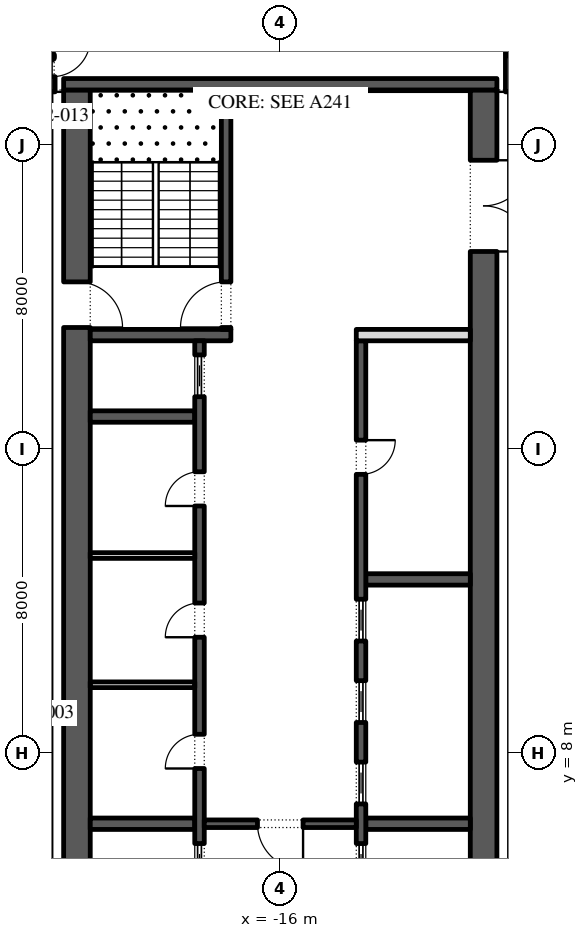
"""IFC4 building model, lengths in metres.
Left out: names, types, materials, properties, quantities, classifications, styles, units other than length and angle.
Written with IfcOpenShell. Run it as: python <this file> out.ifc"""

import sys

from ifc_helpers import new_model, si_unit, direction, frame, frame_2d, origin, place, context, subcontext, project, spatial, rectangle, extrude, element, fill, save


model = new_model("IFC4")
c1 = context("Model", 3, precision=1e-05, world=origin(), true_north=direction((0.0, 1.0)))
c2 = subcontext(c1, "Body", "Model", "MODEL_VIEW")
j1 = project(units=[si_unit("LENGTHUNIT", "METRE"), si_unit("PLANEANGLEUNIT", "RADIAN")], contexts=[c1])
p1 = place(None, origin())
s1 = spatial("IfcSite", under=j1, at=p1, CompositionType="ELEMENT")
p2 = place(p1, origin())
s2 = spatial("IfcBuilding", under=s1, at=p2, CompositionType="ELEMENT")
p3 = place(p2, frame((0.0, 0.0, 175.8)))
s3 = spatial("IfcBuildingStorey", under=s2, at=p3, CompositionType="ELEMENT", Elevation=175.8)
p4 = place(p3, frame((-33.157, 30.092, 0.0), z_axis=(0.0, 0.0, 1.0), x_axis=(0.224950279389, -0.974370243697, 0.0)))
e1 = element("IfcWall", 1, at=p4, inside=s3, PredefinedType="STANDARD", context=c2, shape_type="SweptSolid", body=[
    extrude(rectangle(XDim=49.5, YDim=0.3, at=frame_2d((24.75, 0.0))), origin(), (0.0, 0.0, 1.0), 4.0),
])
p5 = place(p4, frame((2.207, 0.0, 0.0)))
e2 = element("IfcOpeningElement", 2, at=p5, cuts=e1, PredefinedType="OPENING", context=c2, shape_type="SweptSolid", body=[
    extrude(rectangle(XDim=2.4, YDim=3.5, at=frame_2d((1.2, 1.75))), frame((0.0, 0.16, 0.0), z_axis=(0.0, -1.0, 0.0), x_axis=(1.0, 0.0, 0.0)), (0.0, 0.0, 1.0), 0.32),
])
p6 = place(p4, frame((8.121, 0.0, 0.45)))
e3 = element("IfcOpeningElement", 3, at=p6, cuts=e1, PredefinedType="OPENING", context=c2, shape_type="SweptSolid", body=[
    extrude(rectangle(XDim=4.5, YDim=2.825, at=frame_2d((2.25, 1.413))), frame((0.0, 0.16, 0.0), z_axis=(0.0, -1.0, 0.0), x_axis=(1.0, 0.0, 0.0)), (0.0, 0.0, 1.0), 0.32),
])
p7 = place(p4, frame((15.236, 0.0, 0.45)))
e4 = element("IfcOpeningElement", 4, at=p7, cuts=e1, PredefinedType="OPENING", context=c2, shape_type="SweptSolid", body=[
    extrude(rectangle(XDim=4.5, YDim=2.95, at=frame_2d((2.25, 1.475))), frame((0.0, 0.16, 0.0), z_axis=(0.0, -1.0, 0.0), x_axis=(1.0, 0.0, 0.0)), (0.0, 0.0, 1.0), 0.32),
])
p8 = place(p4, frame((22.35, 0.0, 0.45)))
e5 = element("IfcOpeningElement", 5, at=p8, cuts=e1, PredefinedType="OPENING", context=c2, shape_type="SweptSolid", body=[
    extrude(rectangle(XDim=4.5, YDim=3.0, at=frame_2d((2.25, 1.5))), frame((0.0, 0.16, 0.0), z_axis=(0.0, -1.0, 0.0), x_axis=(1.0, 0.0, 0.0)), (0.0, 0.0, 1.0), 0.32),
])
p9 = place(p4, frame((30.514, 0.0, 0.0)))
e6 = element("IfcOpeningElement", 6, at=p9, cuts=e1, PredefinedType="OPENING", context=c2, shape_type="SweptSolid", body=[
    extrude(rectangle(XDim=2.4, YDim=3.5, at=frame_2d((1.2, 1.75))), frame((0.0, 0.16, 0.0), z_axis=(0.0, -1.0, 0.0), x_axis=(1.0, 0.0, 0.0)), (0.0, 0.0, 1.0), 0.32),
])
p10 = place(p4, frame((36.579, 0.0, 0.45)))
e7 = element("IfcOpeningElement", 7, at=p10, cuts=e1, PredefinedType="OPENING", context=c2, shape_type="SweptSolid", body=[
    extrude(rectangle(XDim=4.5, YDim=3.05, at=frame_2d((2.25, 1.525))), frame((0.0, 0.16, 0.0), z_axis=(0.0, -1.0, 0.0), x_axis=(1.0, 0.0, 0.0)), (0.0, 0.0, 1.0), 0.32),
])
p11 = place(p4, frame((43.693, 0.0, 0.45)))
e8 = element("IfcOpeningElement", 8, at=p11, cuts=e1, PredefinedType="OPENING", context=c2, shape_type="SweptSolid", body=[
    extrude(rectangle(XDim=4.5, YDim=3.05, at=frame_2d((2.25, 1.525))), frame((0.0, 0.16, 0.0), z_axis=(0.0, -1.0, 0.0), x_axis=(1.0, 0.0, 0.0)), (0.0, 0.0, 1.0), 0.32),
])
p12 = place(p3, frame((-21.35, -2.45, 0.0), z_axis=(0.0, 0.0, 1.0), x_axis=(0.0, 1.0, 0.0)))
e9 = element("IfcWall", 9, at=p12, inside=s3, PredefinedType="SHEAR", context=c2, shape_type="SweptSolid", body=[
    extrude(rectangle(XDim=27.9, YDim=0.7, at=frame_2d((13.95, 0.0))), origin(), (0.0, 0.0, 1.0), 4.0),
])
p13 = place(p12, frame((5.05, 0.0, 0.0)))
e10 = element("IfcOpeningElement", 10, at=p13, cuts=e9, PredefinedType="OPENING", context=c2, shape_type="SweptSolid", body=[
    extrude(rectangle(XDim=1.2, YDim=2.1, at=frame_2d((0.6, 1.05))), frame((0.0, 0.36, 0.0), z_axis=(0.0, -1.0, 0.0), x_axis=(1.0, 0.0, 0.0)), (0.0, 0.0, 1.0), 0.72),
])
p14 = place(p12, frame((21.65, 0.0, 0.0)))
e11 = element("IfcOpeningElement", 11, at=p14, cuts=e9, PredefinedType="OPENING", context=c2, shape_type="SweptSolid", body=[
    extrude(rectangle(XDim=1.2, YDim=2.1, at=frame_2d((0.6, 1.05))), frame((0.0, 0.36, 0.0), z_axis=(0.0, -1.0, 0.0), x_axis=(1.0, 0.0, 0.0)), (0.0, 0.0, 1.0), 0.72),
])
p15 = place(p3, frame((-10.65, -2.45, 0.0), z_axis=(0.0, 0.0, 1.0), x_axis=(0.0, 1.0, 0.0)))
e12 = element("IfcWall", 12, at=p15, inside=s3, PredefinedType="SHEAR", context=c2, shape_type="SweptSolid", body=[
    extrude(rectangle(XDim=27.9, YDim=0.7, at=frame_2d((13.95, 0.0))), origin(), (0.0, 0.0, 1.0), 4.0),
])
p16 = place(p15, frame((23.65, 0.0, 0.0)))
e13 = element("IfcOpeningElement", 13, at=p16, cuts=e12, PredefinedType="OPENING", context=c2, shape_type="SweptSolid", body=[
    extrude(rectangle(XDim=2.4, YDim=2.1, at=frame_2d((1.2, 1.05))), frame((0.0, 0.36, 0.0), z_axis=(0.0, -1.0, 0.0), x_axis=(1.0, 0.0, 0.0)), (0.0, 0.0, 1.0), 0.72),
])
p17 = place(p15, frame((1.387, 0.0, 0.0)))
e14 = element("IfcOpeningElement", 14, at=p17, cuts=e12, PredefinedType="OPENING", context=c2, shape_type="SweptSolid", body=[
    extrude(rectangle(XDim=0.9, YDim=2.1, at=frame_2d((0.45, 1.05))), frame((0.0, 0.36, 0.0), z_axis=(0.0, -1.0, 0.0), x_axis=(1.0, 0.0, 0.0)), (0.0, 0.0, 1.0), 0.72),
])
p18 = place(p15, frame((4.562, 0.0, 0.0)))
e15 = element("IfcOpeningElement", 15, at=p18, cuts=e12, PredefinedType="OPENING", context=c2, shape_type="SweptSolid", body=[
    extrude(rectangle(XDim=1.0, YDim=2.1, at=frame_2d((0.5, 1.05))), frame((0.0, 0.36, 0.0), z_axis=(0.0, -1.0, 0.0), x_axis=(1.0, 0.0, 0.0)), (0.0, 0.0, 1.0), 0.72),
])
p19 = place(p3, frame((-21.7, 25.6, 0.0), z_axis=(0.0, 0.0, 1.0), x_axis=(1.0, 0.0, 0.0)))
e16 = element("IfcWall", 16, at=p19, inside=s3, PredefinedType="SHEAR", context=c2, shape_type="SweptSolid", body=[
    extrude(rectangle(XDim=11.4, YDim=0.3, at=frame_2d((5.7, 0.0))), origin(), (0.0, 0.0, 1.0), 4.0),
])
p20 = place(p3, frame((-21.0, 19.0, 0.0), z_axis=(0.0, 0.0, 1.0), x_axis=(1.0, 0.0, 0.0)))
e17 = element("IfcWall", 17, at=p20, inside=s3, PredefinedType="SHEAR", context=c2, shape_type="SweptSolid", body=[
    extrude(rectangle(XDim=3.7, YDim=0.3, at=frame_2d((1.85, 0.0))), origin(), (0.0, 0.0, 1.0), 4.0),
])
p21 = place(p3, frame((-17.425, 19.15, 0.0), z_axis=(0.0, 0.0, 1.0), x_axis=(0.0, 1.0, 0.0)))
e18 = element("IfcWall", 18, at=p21, inside=s3, PredefinedType="SHEAR", context=c2, shape_type="SweptSolid", body=[
    extrude(rectangle(XDim=6.3, YDim=0.25, at=frame_2d((3.15, 0.0))), origin(), (0.0, 0.0, 1.0), 4.0),
])
p22 = place(p21, frame((0.05, 0.0, 0.0)))
e19 = element("IfcOpeningElement", 19, at=p22, cuts=e18, PredefinedType="OPENING", context=c2, shape_type="SweptSolid", body=[
    extrude(rectangle(XDim=1.2, YDim=2.1, at=frame_2d((0.6, 1.05))), frame((0.0, 0.135, 0.0), z_axis=(0.0, -1.0, 0.0), x_axis=(1.0, 0.0, 0.0)), (0.0, 0.0, 1.0), 0.27),
])
for number, where, z_axis, x_axis in (
    (20, (-21.0, 6.143, 0.0), (0.0, 0.0, 1.0), (1.0, 0.0, 0.0)),
    (21, (-21.0, 16.857, 0.0), (0.0, 0.0, 1.0), (1.0, 0.0, 0.0)),
):
    element("IfcWall", number, at=place(p3, frame(where, z_axis=z_axis, x_axis=x_axis)), inside=s3, PredefinedType="SHEAR", context=c2, shape_type="SweptSolid", body=[
        extrude(rectangle(XDim=2.75, YDim=0.3, at=frame_2d((1.375, 0.0))), origin(), (0.0, 0.0, 1.0), 4.0),
    ])
p23 = place(p3, frame((-18.125, 4.15, 0.0), z_axis=(0.0, 0.0, 1.0), x_axis=(0.0, 1.0, 0.0)))
e22 = element("IfcWall", 22, at=p23, inside=s3, PredefinedType="SHEAR", context=c2, shape_type="SweptSolid", body=[
    extrude(rectangle(XDim=14.7, YDim=0.25, at=frame_2d((7.35, 0.0))), origin(), (0.0, 0.0, 1.0), 4.0),
])
p24 = place(p23, frame((3.446, 0.0, 0.0)))
e23 = element("IfcOpeningElement", 23, at=p24, cuts=e22, PredefinedType="OPENING", context=c2, shape_type="SweptSolid", body=[
    extrude(rectangle(XDim=0.9, YDim=2.1, at=frame_2d((0.45, 1.05))), frame((0.0, 0.135, 0.0), z_axis=(0.0, -1.0, 0.0), x_axis=(1.0, 0.0, 0.0)), (0.0, 0.0, 1.0), 0.27),
])
p25 = place(p23, frame((6.9, 0.0, 0.0)))
e24 = element("IfcOpeningElement", 24, at=p25, cuts=e22, PredefinedType="OPENING", context=c2, shape_type="SweptSolid", body=[
    extrude(rectangle(XDim=0.9, YDim=2.1, at=frame_2d((0.45, 1.05))), frame((0.0, 0.135, 0.0), z_axis=(0.0, -1.0, 0.0), x_axis=(1.0, 0.0, 0.0)), (0.0, 0.0, 1.0), 0.27),
])
p26 = place(p23, frame((10.354, 0.0, 0.0)))
e25 = element("IfcOpeningElement", 25, at=p26, cuts=e22, PredefinedType="OPENING", context=c2, shape_type="SweptSolid", body=[
    extrude(rectangle(XDim=0.9, YDim=2.1, at=frame_2d((0.45, 1.05))), frame((0.0, 0.135, 0.0), z_axis=(0.0, -1.0, 0.0), x_axis=(1.0, 0.0, 0.0)), (0.0, 0.0, 1.0), 0.27),
])
p27 = place(p23, frame((0.371, 0.0, 0.0)))
e26 = element("IfcOpeningElement", 26, at=p27, cuts=e22, PredefinedType="OPENING", context=c2, shape_type="SweptSolid", body=[
    extrude(rectangle(XDim=1.1, YDim=2.1, at=frame_2d((0.55, 1.05))), frame((0.0, 0.135, 0.0), z_axis=(0.0, -1.0, 0.0), x_axis=(1.0, 0.0, 0.0)), (0.0, 0.0, 1.0), 0.27),
])
p28 = place(p23, frame((13.229, 0.0, 0.0)))
e27 = element("IfcOpeningElement", 27, at=p28, cuts=e22, PredefinedType="OPENING", context=c2, shape_type="SweptSolid", body=[
    extrude(rectangle(XDim=1.1, YDim=2.1, at=frame_2d((0.55, 1.05))), frame((0.0, 0.135, 0.0), z_axis=(0.0, -1.0, 0.0), x_axis=(1.0, 0.0, 0.0)), (0.0, 0.0, 1.0), 0.27),
])
for number, where, z_axis, x_axis in (
    (28, (-21.0, 9.8, 0.0), (0.0, 0.0, 1.0), (1.0, 0.0, 0.0)),
    (29, (-21.0, 13.2, 0.0), (0.0, 0.0, 1.0), (1.0, 0.0, 0.0)),
):
    element("IfcWall", number, at=place(p3, frame(where, z_axis=z_axis, x_axis=x_axis)), inside=s3, PredefinedType="PARTITIONING", context=c2, shape_type="SweptSolid", body=[
        extrude(rectangle(XDim=2.75, YDim=0.15, at=frame_2d((1.375, 0.0))), origin(), (0.0, 0.0, 1.0), 4.0),
    ])
for number, where, z_axis, x_axis in (
    (30, (-13.75, 6.143, 0.0), (0.0, 0.0, 1.0), (1.0, 0.0, 0.0)),
    (31, (-13.75, 12.571, 0.0), (0.0, 0.0, 1.0), (1.0, 0.0, 0.0)),
):
    element("IfcWall", number, at=place(p3, frame(where, z_axis=z_axis, x_axis=x_axis)), inside=s3, PredefinedType="SHEAR", context=c2, shape_type="SweptSolid", body=[
        extrude(rectangle(XDim=2.75, YDim=0.3, at=frame_2d((1.375, 0.0))), origin(), (0.0, 0.0, 1.0), 4.0),
    ])
p29 = place(p3, frame((-13.875, -2.45, 0.0), z_axis=(0.0, 0.0, 1.0), x_axis=(0.0, 1.0, 0.0)))
e32 = element("IfcWall", 32, at=p29, inside=s3, PredefinedType="SHEAR", context=c2, shape_type="SweptSolid", body=[
    extrude(rectangle(XDim=21.3, YDim=0.25, at=frame_2d((10.65, 0.0))), origin(), (0.0, 0.0, 1.0), 4.0),
])
p30 = place(p29, frame((17.786, 0.0, 0.0)))
e33 = element("IfcOpeningElement", 33, at=p30, cuts=e32, PredefinedType="OPENING", context=c2, shape_type="SweptSolid", body=[
    extrude(rectangle(XDim=0.9, YDim=2.1, at=frame_2d((0.45, 1.05))), frame((0.0, 0.135, 0.0), z_axis=(0.0, -1.0, 0.0), x_axis=(1.0, 0.0, 0.0)), (0.0, 0.0, 1.0), 0.27),
])
p31 = place(p29, frame((6.971, 0.0, 0.0)))
e34 = element("IfcOpeningElement", 34, at=p31, cuts=e32, PredefinedType="OPENING", context=c2, shape_type="SweptSolid", body=[
    extrude(rectangle(XDim=1.1, YDim=2.1, at=frame_2d((0.55, 1.05))), frame((0.0, 0.135, 0.0), z_axis=(0.0, -1.0, 0.0), x_axis=(1.0, 0.0, 0.0)), (0.0, 0.0, 1.0), 0.27),
])
p32 = place(p29, frame((9.114, 0.0, 0.0)))
e35 = element("IfcOpeningElement", 35, at=p32, cuts=e32, PredefinedType="OPENING", context=c2, shape_type="SweptSolid", body=[
    extrude(rectangle(XDim=1.1, YDim=2.1, at=frame_2d((0.55, 1.05))), frame((0.0, 0.135, 0.0), z_axis=(0.0, -1.0, 0.0), x_axis=(1.0, 0.0, 0.0)), (0.0, 0.0, 1.0), 0.27),
])
p33 = place(p29, frame((11.257, 0.0, 0.0)))
e36 = element("IfcOpeningElement", 36, at=p33, cuts=e32, PredefinedType="OPENING", context=c2, shape_type="SweptSolid", body=[
    extrude(rectangle(XDim=1.1, YDim=2.1, at=frame_2d((0.55, 1.05))), frame((0.0, 0.135, 0.0), z_axis=(0.0, -1.0, 0.0), x_axis=(1.0, 0.0, 0.0)), (0.0, 0.0, 1.0), 0.27),
])
p34 = place(p29, frame((13.4, 0.0, 0.0)))
e37 = element("IfcOpeningElement", 37, at=p34, cuts=e32, PredefinedType="OPENING", context=c2, shape_type="SweptSolid", body=[
    extrude(rectangle(XDim=1.1, YDim=2.1, at=frame_2d((0.55, 1.05))), frame((0.0, 0.135, 0.0), z_axis=(0.0, -1.0, 0.0), x_axis=(1.0, 0.0, 0.0)), (0.0, 0.0, 1.0), 0.27),
])
p35 = place(p3, frame((-14.0, 19.0, 0.0), z_axis=(0.0, 0.0, 1.0), x_axis=(1.0, 0.0, 0.0)))
e38 = element("IfcWall", 38, at=p35, inside=s3, PredefinedType="PARTITIONING", context=c2, shape_type="SweptSolid", body=[
    extrude(rectangle(XDim=3.0, YDim=0.3, at=frame_2d((1.5, 0.0))), origin(), (0.0, 0.0, 1.0), 4.0),
])
p36 = place(p3, frame((-18.0, 6.143, 0.0), z_axis=(0.0, 0.0, 1.0), x_axis=(1.0, 0.0, 0.0)))
e39 = element("IfcWall", 39, at=p36, inside=s3, PredefinedType="SHEAR", context=c2, shape_type="SweptSolid", body=[
    extrude(rectangle(XDim=4.0, YDim=0.2, at=frame_2d((2.0, 0.0))), origin(), (0.0, 0.0, 1.0), 4.0),
])
p37 = place(p36, frame((1.4, 0.0, 0.0)))
e40 = element("IfcOpeningElement", 40, at=p37, cuts=e39, PredefinedType="OPENING", context=c2, shape_type="SweptSolid", body=[
    extrude(rectangle(XDim=1.2, YDim=2.1, at=frame_2d((0.6, 1.05))), frame((0.0, 0.11, 0.0), z_axis=(0.0, -1.0, 0.0), x_axis=(1.0, 0.0, 0.0)), (0.0, 0.0, 1.0), 0.22),
])
p38 = place(p3, frame((-22.0, 27.325, 0.0), z_axis=(0.0, 0.0, 1.0), x_axis=(0.0, -1.0, 0.0)))
e41 = element("IfcWall", 41, at=p38, inside=s3, PredefinedType="PARTITIONING", context=c2, shape_type="SweptSolid", body=[
    extrude(rectangle(XDim=1.925, YDim=0.15, at=frame_2d((0.962, 0.0))), origin(), (0.0, 0.0, 1.0), 4.0),
])
p39 = place(p38, frame((0.525, 0.0, 0.0)))
e42 = element("IfcOpeningElement", 42, at=p39, cuts=e41, PredefinedType="OPENING", context=c2, shape_type="SweptSolid", body=[
    extrude(rectangle(XDim=1.0, YDim=2.1, at=frame_2d((0.5, 1.05))), frame((0.0, 0.085, 0.0), z_axis=(0.0, -1.0, 0.0), x_axis=(1.0, 0.0, 0.0)), (0.0, 0.0, 1.0), 0.17),
])
p40 = place(p3, frame((-10.0, 25.4, 0.0), z_axis=(0.0, 0.0, 1.0), x_axis=(0.0, 1.0, 0.0)))
e43 = element("IfcWall", 43, at=p40, inside=s3, PredefinedType="PARTITIONING", context=c2, shape_type="SweptSolid", body=[
    extrude(rectangle(XDim=2.0, YDim=0.15, at=frame_2d((1.0, 0.0))), origin(), (0.0, 0.0, 1.0), 4.0),
])
p41 = place(p24, origin())
e44 = element("IfcDoor", 44, at=p41, inside=s3, OperationType="SINGLE_SWING_RIGHT", PredefinedType="DOOR", context=c2, shape_type="SweptSolid", body=[
    extrude(rectangle(XDim=0.9, YDim=2.1, at=frame_2d((0.45, 1.05))), frame((0.0, 0.125, 0.0), z_axis=(0.0, -1.0, 0.0), x_axis=(1.0, 0.0, 0.0)), (0.0, 0.0, 1.0), 0.05),
])
fill(e23, e44)
p42 = place(p25, origin())
e45 = element("IfcDoor", 45, at=p42, inside=s3, OperationType="SINGLE_SWING_RIGHT", PredefinedType="DOOR", context=c2, shape_type="SweptSolid", body=[
    extrude(rectangle(XDim=0.9, YDim=2.1, at=frame_2d((0.45, 1.05))), frame((0.0, 0.125, 0.0), z_axis=(0.0, -1.0, 0.0), x_axis=(1.0, 0.0, 0.0)), (0.0, 0.0, 1.0), 0.05),
])
fill(e24, e45)
p43 = place(p26, origin())
e46 = element("IfcDoor", 46, at=p43, inside=s3, OperationType="SINGLE_SWING_RIGHT", PredefinedType="DOOR", context=c2, shape_type="SweptSolid", body=[
    extrude(rectangle(XDim=0.9, YDim=2.1, at=frame_2d((0.45, 1.05))), frame((0.0, 0.125, 0.0), z_axis=(0.0, -1.0, 0.0), x_axis=(1.0, 0.0, 0.0)), (0.0, 0.0, 1.0), 0.05),
])
fill(e25, e46)
p44 = place(p27, origin())
e47 = element("IfcDoor", 47, at=p44, inside=s3, OperationType="SLIDING_TO_LEFT", PredefinedType="DOOR", context=c2, shape_type="SweptSolid", body=[
    extrude(rectangle(XDim=1.1, YDim=2.1, at=frame_2d((0.55, 1.05))), frame((0.0, 0.025, 0.0), z_axis=(0.0, -1.0, 0.0), x_axis=(1.0, 0.0, 0.0)), (0.0, 0.0, 1.0), 0.05),
])
fill(e26, e47)
p45 = place(p28, origin())
e48 = element("IfcDoor", 48, at=p45, inside=s3, OperationType="SLIDING_TO_LEFT", PredefinedType="DOOR", context=c2, shape_type="SweptSolid", body=[
    extrude(rectangle(XDim=1.1, YDim=2.1, at=frame_2d((0.55, 1.05))), frame((0.0, 0.025, 0.0), z_axis=(0.0, -1.0, 0.0), x_axis=(1.0, 0.0, 0.0)), (0.0, 0.0, 1.0), 0.05),
])
fill(e27, e48)
p46 = place(p30, frame((0.9, -0.2, 0.0), z_axis=(0.0, 0.0, 1.0), x_axis=(-1.0, 0.0, 0.0)))
e49 = element("IfcDoor", 49, at=p46, inside=s3, OperationType="SINGLE_SWING_RIGHT", PredefinedType="DOOR", context=c2, shape_type="SweptSolid", body=[
    extrude(rectangle(XDim=0.9, YDim=2.1, at=frame_2d((0.45, 1.05))), frame((0.0, -0.075, 0.0), z_axis=(0.0, -1.0, 0.0), x_axis=(1.0, 0.0, 0.0)), (0.0, 0.0, 1.0), 0.05),
])
fill(e33, e49)
p47 = place(p31, origin())
e50 = element("IfcDoor", 50, at=p47, inside=s3, OperationType="SLIDING_TO_LEFT", PredefinedType="DOOR", context=c2, shape_type="SweptSolid", body=[
    extrude(rectangle(XDim=1.1, YDim=2.1, at=frame_2d((0.55, 1.05))), frame((0.0, 0.025, 0.0), z_axis=(0.0, -1.0, 0.0), x_axis=(1.0, 0.0, 0.0)), (0.0, 0.0, 1.0), 0.05),
])
fill(e34, e50)
p48 = place(p32, origin())
e51 = element("IfcDoor", 51, at=p48, inside=s3, OperationType="SLIDING_TO_LEFT", PredefinedType="DOOR", context=c2, shape_type="SweptSolid", body=[
    extrude(rectangle(XDim=1.1, YDim=2.1, at=frame_2d((0.55, 1.05))), frame((0.0, 0.025, 0.0), z_axis=(0.0, -1.0, 0.0), x_axis=(1.0, 0.0, 0.0)), (0.0, 0.0, 1.0), 0.05),
])
fill(e35, e51)
p49 = place(p33, origin())
e52 = element("IfcDoor", 52, at=p49, inside=s3, OperationType="SLIDING_TO_LEFT", PredefinedType="DOOR", context=c2, shape_type="SweptSolid", body=[
    extrude(rectangle(XDim=1.1, YDim=2.1, at=frame_2d((0.55, 1.05))), frame((0.0, 0.025, 0.0), z_axis=(0.0, -1.0, 0.0), x_axis=(1.0, 0.0, 0.0)), (0.0, 0.0, 1.0), 0.05),
])
fill(e36, e52)
p50 = place(p34, origin())
e53 = element("IfcDoor", 53, at=p50, inside=s3, OperationType="SLIDING_TO_LEFT", PredefinedType="DOOR", context=c2, shape_type="SweptSolid", body=[
    extrude(rectangle(XDim=1.1, YDim=2.1, at=frame_2d((0.55, 1.05))), frame((0.0, 0.025, 0.0), z_axis=(0.0, -1.0, 0.0), x_axis=(1.0, 0.0, 0.0)), (0.0, 0.0, 1.0), 0.05),
])
fill(e37, e53)
p51 = place(p37, frame((1.2, 0.0, 0.0), z_axis=(0.0, 0.0, 1.0), x_axis=(-1.0, 0.0, 0.0)))
e54 = element("IfcDoor", 54, at=p51, inside=s3, OperationType="SINGLE_SWING_RIGHT", PredefinedType="DOOR", context=c2, shape_type="SweptSolid", body=[
    extrude(rectangle(XDim=1.2, YDim=2.1, at=frame_2d((0.6, 1.05))), frame((0.0, 0.025, 0.0), z_axis=(0.0, -1.0, 0.0), x_axis=(1.0, 0.0, 0.0)), (0.0, 0.0, 1.0), 0.05),
])
fill(e40, e54)
p52 = place(p16, frame((2.4, 0.0, 0.0), z_axis=(0.0, 0.0, 1.0), x_axis=(-1.0, 0.0, 0.0)))
e55 = element("IfcDoor", 55, at=p52, inside=s3, OperationType="DOUBLE_DOOR_SINGLE_SWING", PredefinedType="DOOR", context=c2, shape_type="SweptSolid", body=[
    extrude(rectangle(XDim=2.4, YDim=2.1, at=frame_2d((1.2, 1.05))), frame((0.0, 0.025, 0.0), z_axis=(0.0, -1.0, 0.0), x_axis=(1.0, 0.0, 0.0)), (0.0, 0.0, 1.0), 0.05),
])
fill(e13, e55)
p53 = place(p22, origin())
e56 = element("IfcDoor", 56, at=p53, inside=s3, OperationType="SINGLE_SWING_RIGHT", PredefinedType="DOOR", context=c2, shape_type="SweptSolid", body=[
    extrude(rectangle(XDim=1.2, YDim=2.1, at=frame_2d((0.6, 1.05))), frame((0.0, 0.025, 0.0), z_axis=(0.0, -1.0, 0.0), x_axis=(1.0, 0.0, 0.0)), (0.0, 0.0, 1.0), 0.05),
])
fill(e19, e56)
p54 = place(p14, frame((1.2, 0.0, 0.0), z_axis=(0.0, 0.0, 1.0), x_axis=(-1.0, 0.0, 0.0)))
e57 = element("IfcDoor", 57, at=p54, inside=s3, OperationType="SINGLE_SWING_LEFT", PredefinedType="DOOR", context=c2, shape_type="SweptSolid", body=[
    extrude(rectangle(XDim=1.2, YDim=2.1, at=frame_2d((0.6, 1.05))), frame((0.0, 0.025, 0.0), z_axis=(0.0, -1.0, 0.0), x_axis=(1.0, 0.0, 0.0)), (0.0, 0.0, 1.0), 0.05),
])
fill(e11, e57)
p55 = place(p39, origin())
e58 = element("IfcDoor", 58, at=p55, inside=s3, OperationType="SINGLE_SWING_RIGHT", PredefinedType="DOOR", context=c2, shape_type="SweptSolid", body=[
    extrude(rectangle(XDim=1.0, YDim=2.1, at=frame_2d((0.5, 1.05))), frame((0.0, 0.025, 0.0), z_axis=(0.0, -1.0, 0.0), x_axis=(1.0, 0.0, 0.0)), (0.0, 0.0, 1.0), 0.05),
])
fill(e42, e58)
save(model, sys.argv[1])
